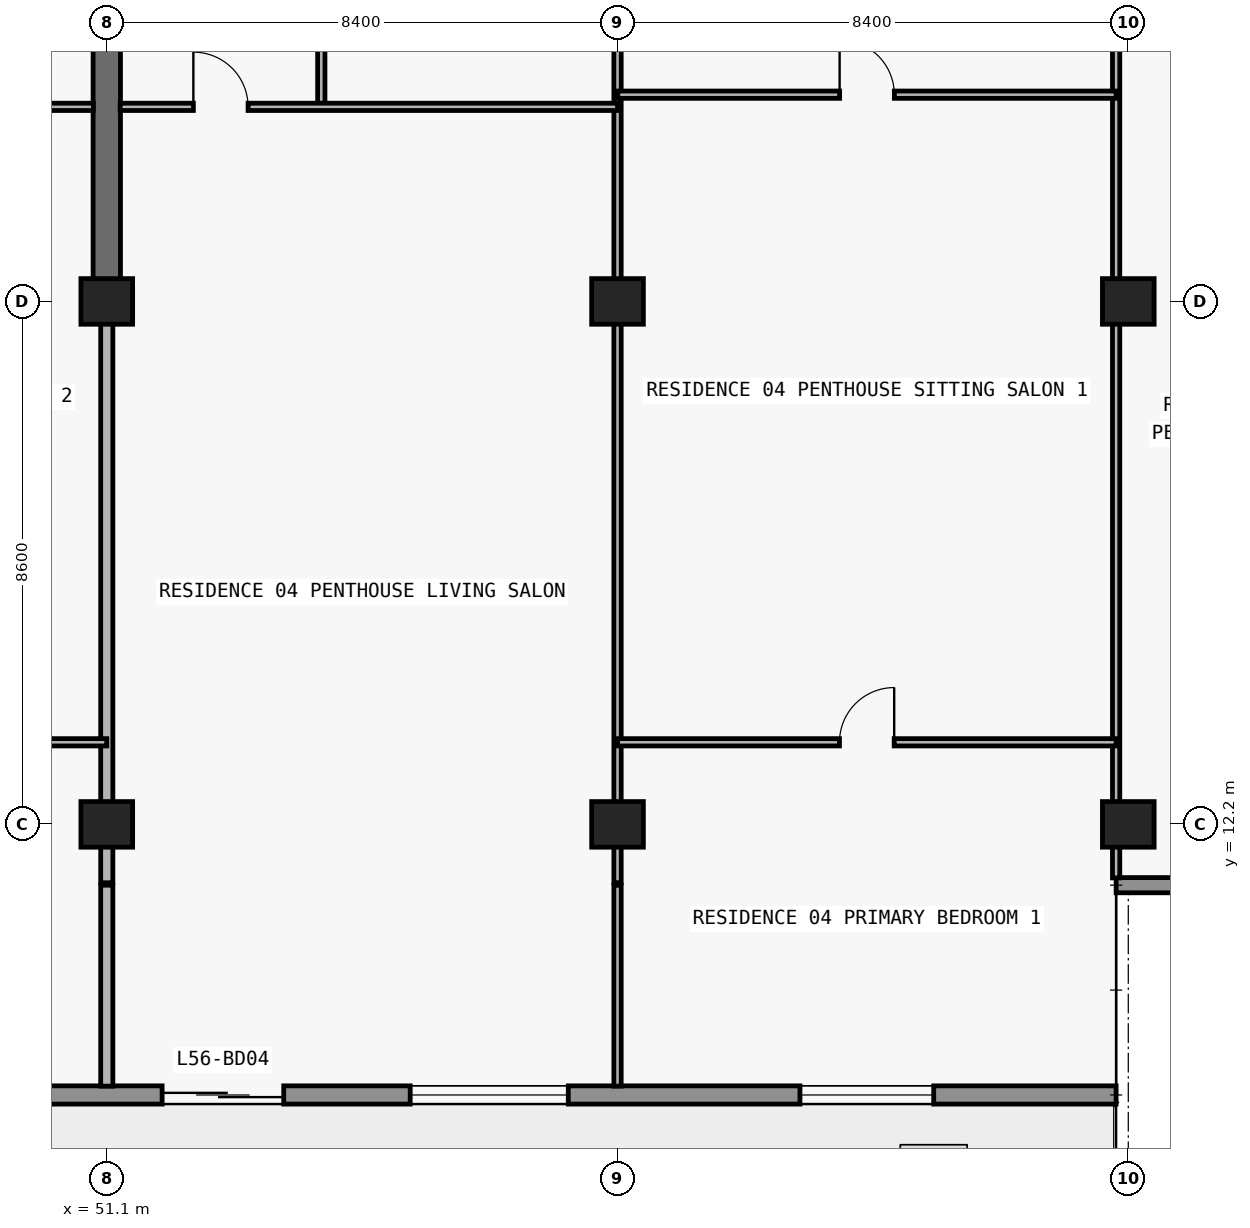
"""IFC4 building model, lengths in metres.
Left out: names, types, materials, properties, quantities, classifications, styles, units other than length and angle.
Written with IfcOpenShell. Run it as: python <this file> out.ifc"""

import sys

from ifc_helpers import new_model, si_unit, direction, frame, frame_2d, origin, origin_2d, place, context, subcontext, project, spatial, rectangle, extrude, element, fill, save


model = new_model("IFC4")
c1 = context("Model", 3, precision=1e-05, world=origin(), true_north=direction((0.0, 1.0)))
c2 = subcontext(c1, "Body", "Model", "MODEL_VIEW")
j1 = project(units=[si_unit("LENGTHUNIT", "METRE"), si_unit("PLANEANGLEUNIT", "RADIAN")], contexts=[c1])
p1 = place(None, origin())
s1 = spatial("IfcSite", under=j1, at=p1, CompositionType="ELEMENT")
p2 = place(p1, origin())
s2 = spatial("IfcBuilding", under=s1, at=p2, CompositionType="ELEMENT")
p3 = place(p2, frame((0.0, 0.0, 201.6)))
s3 = spatial("IfcBuildingStorey", under=s2, at=p3, CompositionType="ELEMENT", Elevation=201.6)
for number, where, z_axis, x_axis in (
    (1, (51.1, 12.2, 0.0), (0.0, 0.0, 1.0), (1.0, 0.0, 0.0)),
    (2, (59.5, 12.2, 0.0), (0.0, 0.0, 1.0), (1.0, 0.0, 0.0)),
    (3, (67.9, 12.2, 0.0), (0.0, 0.0, 1.0), (1.0, 0.0, 0.0)),
    (4, (51.1, 20.8, 0.0), (0.0, 0.0, 1.0), (1.0, 0.0, 0.0)),
    (5, (59.5, 20.8, 0.0), (0.0, 0.0, 1.0), (1.0, 0.0, 0.0)),
    (6, (67.9, 20.8, 0.0), (0.0, 0.0, 1.0), (1.0, 0.0, 0.0)),
):
    element("IfcColumn", number, at=place(p3, frame(where, z_axis=z_axis, x_axis=x_axis)), inside=s3, PredefinedType="COLUMN", context=c2, shape_type="SweptSolid", body=[
        extrude(rectangle(XDim=0.85, YDim=0.75, at=origin_2d()), origin(), (0.0, 0.0, 1.0), 3.05),
    ])
p4 = place(p3, frame((51.1, 20.8, 0.0), z_axis=(0.0, 0.0, 1.0), x_axis=(0.0, 1.0, 0.0)))
e7 = element("IfcWall", 7, at=p4, inside=s3, PredefinedType="SHEAR", context=c2, shape_type="SweptSolid", body=[
    extrude(rectangle(XDim=8.6, YDim=0.45, at=frame_2d((4.3, 0.0))), origin(), (0.0, 0.0, 1.0), 3.05),
])
p5 = place(p3, frame((67.7, 7.75, 0.0), z_axis=(0.0, 0.0, 1.0), x_axis=(-1.0, 0.0, 0.0)))
e8 = element("IfcWall", 8, at=p5, inside=s3, PredefinedType="STANDARD", context=c2, shape_type="SweptSolid", body=[
    extrude(rectangle(XDim=57.6, YDim=0.3, at=frame_2d((28.8, 0.0))), origin(), (0.0, 0.0, 1.0), 3.05),
])
p6 = place(p5, frame((54.673, 0.0, 0.0)))
e9 = element("IfcOpeningElement", 9, at=p6, cuts=e8, PredefinedType="OPENING", context=c2, shape_type="SweptSolid", body=[
    extrude(rectangle(XDim=2.0, YDim=2.3, at=frame_2d((1.0, 1.15))), frame((0.0, 0.16, 0.0), z_axis=(0.0, -1.0, 0.0), x_axis=(1.0, 0.0, 0.0)), (0.0, 0.0, 1.0), 0.32),
])
p7 = place(p5, frame((50.473, 0.0, 0.85)))
e10 = element("IfcOpeningElement", 10, at=p7, cuts=e8, PredefinedType="OPENING", context=c2, shape_type="SweptSolid", body=[
    extrude(rectangle(XDim=2.2, YDim=1.55, at=frame_2d((1.1, 0.775))), frame((0.0, 0.16, 0.0), z_axis=(0.0, -1.0, 0.0), x_axis=(1.0, 0.0, 0.0)), (0.0, 0.0, 1.0), 0.32),
])
p8 = place(p5, frame((46.09, 0.0, 0.0)))
e11 = element("IfcOpeningElement", 11, at=p8, cuts=e8, PredefinedType="OPENING", context=c2, shape_type="SweptSolid", body=[
    extrude(rectangle(XDim=2.0, YDim=2.3, at=frame_2d((1.0, 1.15))), frame((0.0, 0.16, 0.0), z_axis=(0.0, -1.0, 0.0), x_axis=(1.0, 0.0, 0.0)), (0.0, 0.0, 1.0), 0.32),
])
p9 = place(p5, frame((41.99, 0.0, 0.85)))
e12 = element("IfcOpeningElement", 12, at=p9, cuts=e8, PredefinedType="OPENING", context=c2, shape_type="SweptSolid", body=[
    extrude(rectangle(XDim=1.8, YDim=1.55, at=frame_2d((0.9, 0.775))), frame((0.0, 0.16, 0.0), z_axis=(0.0, -1.0, 0.0), x_axis=(1.0, 0.0, 0.0)), (0.0, 0.0, 1.0), 0.32),
])
p10 = place(p5, frame((38.09, 0.0, 0.0)))
e13 = element("IfcOpeningElement", 13, at=p10, cuts=e8, PredefinedType="OPENING", context=c2, shape_type="SweptSolid", body=[
    extrude(rectangle(XDim=2.0, YDim=2.3, at=frame_2d((1.0, 1.15))), frame((0.0, 0.16, 0.0), z_axis=(0.0, -1.0, 0.0), x_axis=(1.0, 0.0, 0.0)), (0.0, 0.0, 1.0), 0.32),
])
p11 = place(p5, frame((33.41, 0.0, 0.65)))
e14 = element("IfcOpeningElement", 14, at=p11, cuts=e8, PredefinedType="OPENING", context=c2, shape_type="SweptSolid", body=[
    extrude(rectangle(XDim=2.6, YDim=1.85, at=frame_2d((1.3, 0.925))), frame((0.0, 0.16, 0.0), z_axis=(0.0, -1.0, 0.0), x_axis=(1.0, 0.0, 0.0)), (0.0, 0.0, 1.0), 0.32),
])
p12 = place(p5, frame((27.7, 0.0, 0.85)))
e15 = element("IfcOpeningElement", 15, at=p12, cuts=e8, PredefinedType="OPENING", context=c2, shape_type="SweptSolid", body=[
    extrude(rectangle(XDim=2.2, YDim=1.55, at=frame_2d((1.1, 0.775))), frame((0.0, 0.16, 0.0), z_axis=(0.0, -1.0, 0.0), x_axis=(1.0, 0.0, 0.0)), (0.0, 0.0, 1.0), 0.32),
])
p13 = place(p5, frame((19.7, 0.0, 0.85)))
e16 = element("IfcOpeningElement", 16, at=p13, cuts=e8, PredefinedType="OPENING", context=c2, shape_type="SweptSolid", body=[
    extrude(rectangle(XDim=2.2, YDim=1.55, at=frame_2d((1.1, 0.775))), frame((0.0, 0.16, 0.0), z_axis=(0.0, -1.0, 0.0), x_axis=(1.0, 0.0, 0.0)), (0.0, 0.0, 1.0), 0.32),
])
p14 = place(p5, frame((13.69, 0.0, 0.0)))
e17 = element("IfcOpeningElement", 17, at=p14, cuts=e8, PredefinedType="OPENING", context=c2, shape_type="SweptSolid", body=[
    extrude(rectangle(XDim=2.0, YDim=2.3, at=frame_2d((1.0, 1.15))), frame((0.0, 0.16, 0.0), z_axis=(0.0, -1.0, 0.0), x_axis=(1.0, 0.0, 0.0)), (0.0, 0.0, 1.0), 0.32),
])
p15 = place(p5, frame((9.01, 0.0, 0.65)))
e18 = element("IfcOpeningElement", 18, at=p15, cuts=e8, PredefinedType="OPENING", context=c2, shape_type="SweptSolid", body=[
    extrude(rectangle(XDim=2.6, YDim=1.85, at=frame_2d((1.3, 0.925))), frame((0.0, 0.16, 0.0), z_axis=(0.0, -1.0, 0.0), x_axis=(1.0, 0.0, 0.0)), (0.0, 0.0, 1.0), 0.32),
])
p16 = place(p5, frame((3.0, 0.0, 0.85)))
e19 = element("IfcOpeningElement", 19, at=p16, cuts=e8, PredefinedType="OPENING", context=c2, shape_type="SweptSolid", body=[
    extrude(rectangle(XDim=2.2, YDim=1.55, at=frame_2d((1.1, 0.775))), frame((0.0, 0.16, 0.0), z_axis=(0.0, -1.0, 0.0), x_axis=(1.0, 0.0, 0.0)), (0.0, 0.0, 1.0), 0.32),
])
p17 = place(p3, frame((67.7, 11.2, 0.0), z_axis=(0.0, 0.0, 1.0), x_axis=(1.0, 0.0, 0.0)))
e20 = element("IfcWall", 20, at=p17, inside=s3, PredefinedType="ELEMENTEDWALL", context=c2, shape_type="SweptSolid", body=[
    extrude(rectangle(XDim=3.85, YDim=0.25, at=frame_2d((1.925, 0.0))), origin(), (0.0, 0.0, 1.0), 3.05),
])
p18 = place(p3, frame((51.1, 7.895, 0.0), z_axis=(0.0, 0.0, 1.0), x_axis=(0.0, 1.0, 0.0)))
e21 = element("IfcWall", 21, at=p18, inside=s3, PredefinedType="PARTITIONING", context=c2, shape_type="SweptSolid", body=[
    extrude(rectangle(XDim=3.305, YDim=0.2, at=frame_2d((1.652, 0.0))), origin(), (0.0, 0.0, 1.0), 3.05),
])
p19 = place(p3, frame((51.1, 11.24, 0.0), z_axis=(0.0, 0.0, 1.0), x_axis=(0.0, 1.0, 0.0)))
e22 = element("IfcWall", 22, at=p19, inside=s3, PredefinedType="PARTITIONING", context=c2, shape_type="SweptSolid", body=[
    extrude(rectangle(XDim=9.555, YDim=0.2, at=frame_2d((4.777, 0.0))), origin(), (0.0, 0.0, 1.0), 2.263),
])
p20 = place(p3, frame((54.628, 24.0, 0.0), z_axis=(0.0, 0.0, 1.0), x_axis=(0.0, 1.0, 0.0)))
e23 = element("IfcWall", 23, at=p20, inside=s3, PredefinedType="PARTITIONING", context=c2, shape_type="SweptSolid", body=[
    extrude(rectangle(XDim=4.8, YDim=0.12, at=frame_2d((2.4, 0.0))), origin(), (0.0, 0.0, 1.0), 3.05),
])
p21 = place(p20, frame((1.95, 0.0, 0.0)))
e24 = element("IfcOpeningElement", 24, at=p21, cuts=e23, PredefinedType="OPENING", context=c2, shape_type="SweptSolid", body=[
    extrude(rectangle(XDim=0.9, YDim=2.15, at=frame_2d((0.45, 1.075))), frame((0.0, 0.07, 0.0), z_axis=(0.0, -1.0, 0.0), x_axis=(1.0, 0.0, 0.0)), (0.0, 0.0, 1.0), 0.14),
])
p22 = place(p3, frame((59.5, 7.895, 0.0), z_axis=(0.0, 0.0, 1.0), x_axis=(0.0, 1.0, 0.0)))
e25 = element("IfcWall", 25, at=p22, inside=s3, PredefinedType="PARTITIONING", context=c2, shape_type="SweptSolid", body=[
    extrude(rectangle(XDim=3.305, YDim=0.12, at=frame_2d((1.652, 0.0))), origin(), (0.0, 0.0, 1.0), 3.05),
])
p23 = place(p3, frame((59.5, 11.24, 0.0), z_axis=(0.0, 0.0, 1.0), x_axis=(0.0, 1.0, 0.0)))
e26 = element("IfcWall", 26, at=p23, inside=s3, PredefinedType="PARTITIONING", context=c2, shape_type="SweptSolid", body=[
    extrude(rectangle(XDim=23.46, YDim=0.12, at=frame_2d((11.73, 0.0))), origin(), (0.0, 0.0, 1.0), 2.263),
])
p24 = place(p23, frame((14.71, 0.0, 0.0)))
e27 = element("IfcOpeningElement", 27, at=p24, cuts=e26, PredefinedType="OPENING", context=c2, shape_type="SweptSolid", body=[
    extrude(rectangle(XDim=0.9, YDim=2.15, at=frame_2d((0.45, 1.075))), frame((0.0, 0.07, 0.0), z_axis=(0.0, -1.0, 0.0), x_axis=(1.0, 0.0, 0.0)), (0.0, 0.0, 1.0), 0.14),
])
p25 = place(p3, frame((67.7, 11.32, 0.0), z_axis=(0.0, 0.0, 1.0), x_axis=(0.0, 1.0, 0.0)))
e28 = element("IfcWall", 28, at=p25, inside=s3, PredefinedType="PARTITIONING", context=c2, shape_type="SweptSolid", body=[
    extrude(rectangle(XDim=23.38, YDim=0.12, at=frame_2d((11.69, 0.0))), origin(), (0.0, 0.0, 1.0), 2.263),
])
p26 = place(p25, frame((14.63, 0.0, 0.0)))
e29 = element("IfcOpeningElement", 29, at=p26, cuts=e28, PredefinedType="OPENING", context=c2, shape_type="SweptSolid", body=[
    extrude(rectangle(XDim=0.9, YDim=2.15, at=frame_2d((0.45, 1.075))), frame((0.0, 0.07, 0.0), z_axis=(0.0, -1.0, 0.0), x_axis=(1.0, 0.0, 0.0)), (0.0, 0.0, 1.0), 0.14),
])
p27 = place(p3, frame((41.2, 13.55, 0.0), z_axis=(0.0, 0.0, 1.0), x_axis=(1.0, 0.0, 0.0)))
e30 = element("IfcWall", 30, at=p27, inside=s3, PredefinedType="PARTITIONING", context=c2, shape_type="SweptSolid", body=[
    extrude(rectangle(XDim=9.9, YDim=0.12, at=frame_2d((4.95, 0.0))), origin(), (0.0, 0.0, 1.0), 3.05),
])
p28 = place(p27, frame((5.25, 0.0, 0.0)))
e31 = element("IfcOpeningElement", 31, at=p28, cuts=e30, PredefinedType="OPENING", context=c2, shape_type="SweptSolid", body=[
    extrude(rectangle(XDim=0.9, YDim=2.15, at=frame_2d((0.45, 1.075))), frame((0.0, 0.07, 0.0), z_axis=(0.0, -1.0, 0.0), x_axis=(1.0, 0.0, 0.0)), (0.0, 0.0, 1.0), 0.14),
])
p29 = place(p3, frame((59.5, 13.55, 0.0), z_axis=(0.0, 0.0, 1.0), x_axis=(1.0, 0.0, 0.0)))
e32 = element("IfcWall", 32, at=p29, inside=s3, PredefinedType="PARTITIONING", context=c2, shape_type="SweptSolid", body=[
    extrude(rectangle(XDim=8.2, YDim=0.12, at=frame_2d((4.1, 0.0))), origin(), (0.0, 0.0, 1.0), 3.05),
])
p30 = place(p29, frame((3.65, 0.0, 0.0)))
e33 = element("IfcOpeningElement", 33, at=p30, cuts=e32, PredefinedType="OPENING", context=c2, shape_type="SweptSolid", body=[
    extrude(rectangle(XDim=0.9, YDim=2.15, at=frame_2d((0.45, 1.075))), frame((0.0, 0.07, 0.0), z_axis=(0.0, -1.0, 0.0), x_axis=(1.0, 0.0, 0.0)), (0.0, 0.0, 1.0), 0.14),
])
p31 = place(p3, frame((42.7, 24.0, 0.0), z_axis=(0.0, 0.0, 1.0), x_axis=(1.0, 0.0, 0.0)))
e34 = element("IfcWall", 34, at=p31, inside=s3, PredefinedType="PARTITIONING", context=c2, shape_type="SweptSolid", body=[
    extrude(rectangle(XDim=8.18, YDim=0.12, at=frame_2d((4.09, 0.0))), origin(), (0.0, 0.0, 1.0), 3.05),
])
p32 = place(p31, frame((3.64, 0.0, 0.0)))
e35 = element("IfcOpeningElement", 35, at=p32, cuts=e34, PredefinedType="OPENING", context=c2, shape_type="SweptSolid", body=[
    extrude(rectangle(XDim=0.9, YDim=2.15, at=frame_2d((0.45, 1.075))), frame((0.0, 0.07, 0.0), z_axis=(0.0, -1.0, 0.0), x_axis=(1.0, 0.0, 0.0)), (0.0, 0.0, 1.0), 0.14),
])
p33 = place(p3, frame((51.32, 24.0, 0.0), z_axis=(0.0, 0.0, 1.0), x_axis=(1.0, 0.0, 0.0)))
e36 = element("IfcWall", 36, at=p33, inside=s3, PredefinedType="PARTITIONING", context=c2, shape_type="SweptSolid", body=[
    extrude(rectangle(XDim=8.18, YDim=0.12, at=frame_2d((4.09, 0.0))), origin(), (0.0, 0.0, 1.0), 3.05),
])
p34 = place(p33, frame((1.204, 0.0, 0.0)))
e37 = element("IfcOpeningElement", 37, at=p34, cuts=e36, PredefinedType="OPENING", context=c2, shape_type="SweptSolid", body=[
    extrude(rectangle(XDim=0.9, YDim=2.15, at=frame_2d((0.45, 1.075))), frame((0.0, 0.07, 0.0), z_axis=(0.0, -1.0, 0.0), x_axis=(1.0, 0.0, 0.0)), (0.0, 0.0, 1.0), 0.14),
])
p35 = place(p3, frame((59.505, 24.2, 0.0), z_axis=(0.0, 0.0, 1.0), x_axis=(1.0, 0.0, 0.0)))
e38 = element("IfcWall", 38, at=p35, inside=s3, PredefinedType="PARTITIONING", context=c2, shape_type="SweptSolid", body=[
    extrude(rectangle(XDim=8.195, YDim=0.12, at=frame_2d((4.098, 0.0))), origin(), (0.0, 0.0, 1.0), 3.05),
])
p36 = place(p35, frame((3.647, 0.0, 0.0)))
e39 = element("IfcOpeningElement", 39, at=p36, cuts=e38, PredefinedType="OPENING", context=c2, shape_type="SweptSolid", body=[
    extrude(rectangle(XDim=0.9, YDim=2.15, at=frame_2d((0.45, 1.075))), frame((0.0, 0.07, 0.0), z_axis=(0.0, -1.0, 0.0), x_axis=(1.0, 0.0, 0.0)), (0.0, 0.0, 1.0), 0.14),
])
p37 = place(p14, origin())
e40 = element("IfcDoor", 40, at=p37, inside=s3, OperationType="DOUBLE_DOOR_SLIDING", PredefinedType="DOOR", context=c2, shape_type="SweptSolid", body=[
    extrude(rectangle(XDim=2.0, YDim=2.3, at=frame_2d((1.0, 1.15))), frame((0.0, 0.025, 0.0), z_axis=(0.0, -1.0, 0.0), x_axis=(1.0, 0.0, 0.0)), (0.0, 0.0, 1.0), 0.05),
])
fill(e17, e40)
p38 = place(p15, origin())
e41 = element("IfcWindow", 41, at=p38, inside=s3, PartitioningType="SINGLE_PANEL", PredefinedType="WINDOW", context=c2, shape_type="SweptSolid", body=[
    extrude(rectangle(XDim=2.6, YDim=1.85, at=frame_2d((1.3, 0.925))), frame((0.0, 0.03, 0.0), z_axis=(0.0, -1.0, 0.0), x_axis=(1.0, 0.0, 0.0)), (0.0, 0.0, 1.0), 0.06),
])
fill(e18, e41)
p39 = place(p16, origin())
e42 = element("IfcWindow", 42, at=p39, inside=s3, PartitioningType="SINGLE_PANEL", PredefinedType="WINDOW", context=c2, shape_type="SweptSolid", body=[
    extrude(rectangle(XDim=2.2, YDim=1.55, at=frame_2d((1.1, 0.775))), frame((0.0, 0.03, 0.0), z_axis=(0.0, -1.0, 0.0), x_axis=(1.0, 0.0, 0.0)), (0.0, 0.0, 1.0), 0.06),
])
fill(e19, e42)
p40 = place(p34, origin())
e43 = element("IfcDoor", 43, at=p40, inside=s3, OperationType="SINGLE_SWING_LEFT", PredefinedType="DOOR", context=c2, shape_type="SweptSolid", body=[
    extrude(rectangle(XDim=0.9, YDim=2.15, at=frame_2d((0.45, 1.075))), frame((0.0, 0.025, 0.0), z_axis=(0.0, -1.0, 0.0), x_axis=(1.0, 0.0, 0.0)), (0.0, 0.0, 1.0), 0.05),
])
fill(e37, e43)
p41 = place(p36, origin())
e44 = element("IfcDoor", 44, at=p41, inside=s3, OperationType="SINGLE_SWING_LEFT", PredefinedType="DOOR", context=c2, shape_type="SweptSolid", body=[
    extrude(rectangle(XDim=0.9, YDim=2.15, at=frame_2d((0.45, 1.075))), frame((0.0, 0.025, 0.0), z_axis=(0.0, -1.0, 0.0), x_axis=(1.0, 0.0, 0.0)), (0.0, 0.0, 1.0), 0.05),
])
fill(e39, e44)
p42 = place(p30, origin())
e45 = element("IfcDoor", 45, at=p42, inside=s3, OperationType="SINGLE_SWING_RIGHT", PredefinedType="DOOR", context=c2, shape_type="SweptSolid", body=[
    extrude(rectangle(XDim=0.9, YDim=2.15, at=frame_2d((0.45, 1.075))), frame((0.0, 0.025, 0.0), z_axis=(0.0, -1.0, 0.0), x_axis=(1.0, 0.0, 0.0)), (0.0, 0.0, 1.0), 0.05),
])
fill(e33, e45)
save(model, sys.argv[1])
